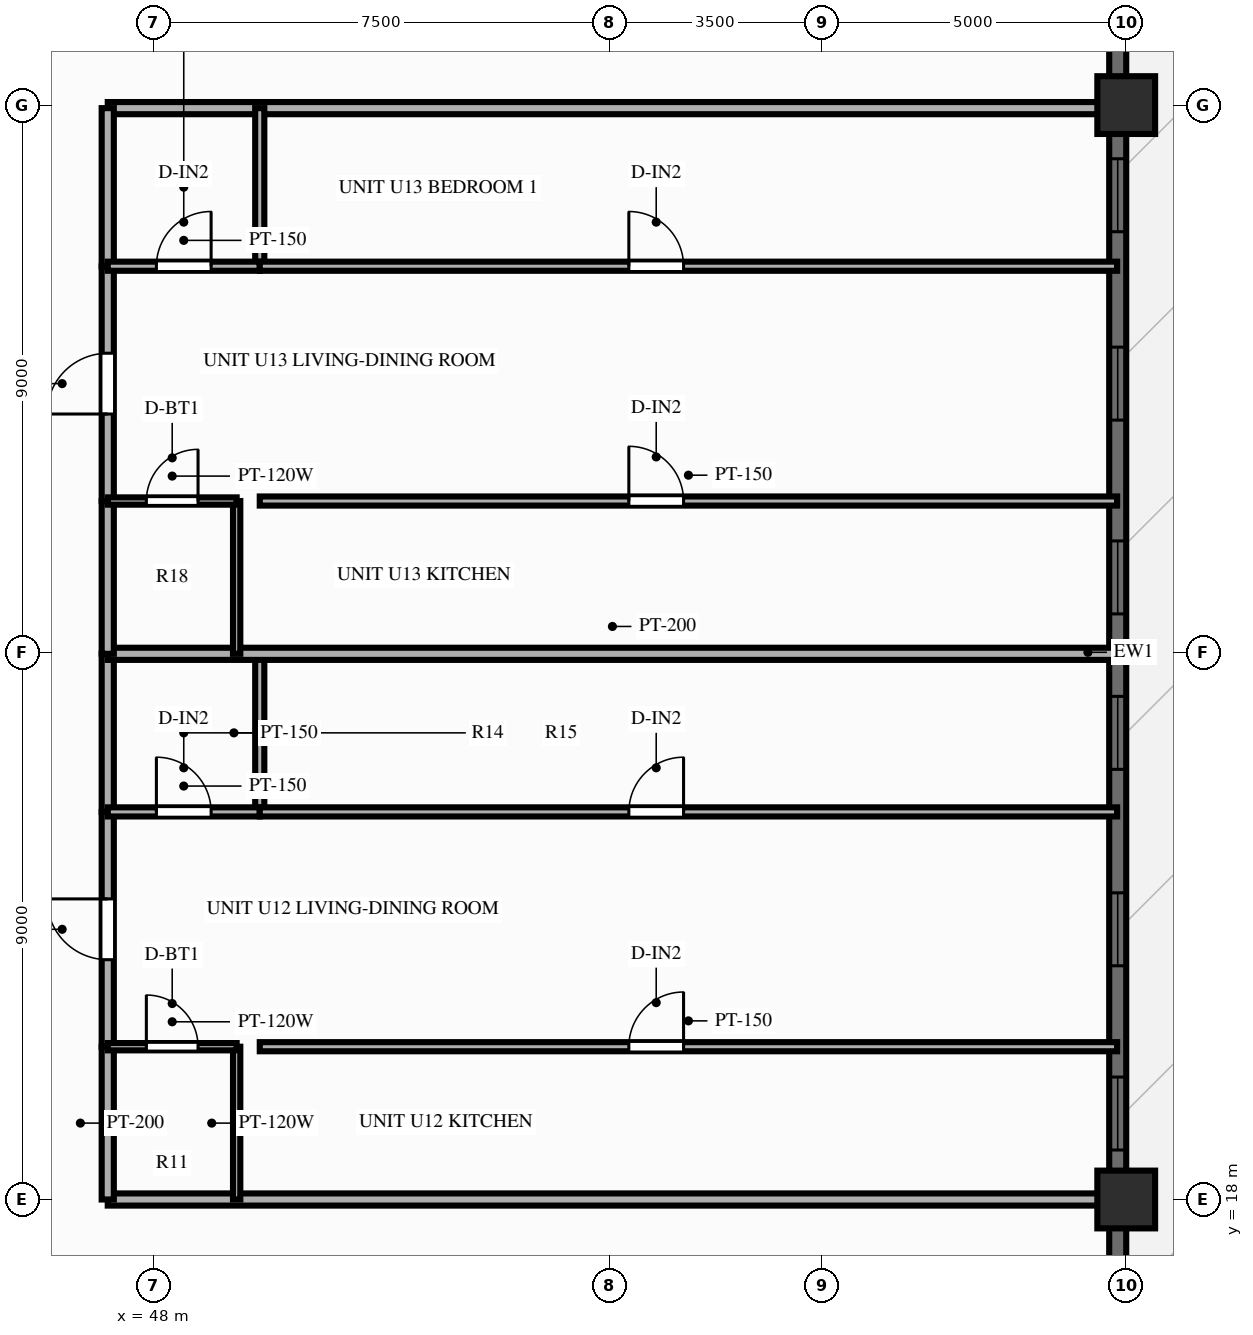
"""IFC4 building model, lengths in metres.
Left out: names, types, materials, properties, quantities, classifications, styles, units other than length and angle.
Written with IfcOpenShell. Run it as: python <this file> out.ifc"""

import sys

from ifc_helpers import new_model, si_unit, direction, frame, frame_2d, origin, origin_2d, place, context, subcontext, project, spatial, rectangle, extrude, source, transform, mapped, element, fill, save


model = new_model("IFC4")
c1 = context("Model", 3, precision=1e-05, world=origin(), true_north=direction((0.0, 1.0)))
c2 = subcontext(c1, "Body", "Model", "MODEL_VIEW")
j1 = project(units=[si_unit("LENGTHUNIT", "METRE"), si_unit("PLANEANGLEUNIT", "RADIAN")], contexts=[c1])
p1 = place(None, origin())
s1 = spatial("IfcSite", under=j1, at=p1, CompositionType="ELEMENT")
p2 = place(p1, origin())
s2 = spatial("IfcBuilding", under=s1, at=p2, CompositionType="ELEMENT")
p3 = place(p2, frame((0.0, 0.0, 86.85)))
s3 = spatial("IfcBuildingStorey", under=s2, at=p3, CompositionType="ELEMENT", Elevation=86.85)
m1 = source(origin(), c2, "Body", "SweptSolid", [
    extrude(rectangle(XDim=0.95, YDim=0.95, at=origin_2d()), origin(), (0.0, 0.0, 1.0), 3.0),
])
for number, where, z_axis, x_axis in (
    (1, (64.0, 18.0, 0.0), (0.0, 0.0, 1.0), (1.0, 0.0, 0.0)),
    (2, (64.0, 36.0, 0.0), (0.0, 0.0, 1.0), (1.0, 0.0, 0.0)),
):
    element("IfcColumn", number, at=place(p3, frame(where, z_axis=z_axis, x_axis=x_axis)), inside=s3, PredefinedType="COLUMN", context=c2, shape_type="MappedRepresentation", body=[
        mapped(m1, transform((0.0, 0.0, 0.0), scale=1.0)),
    ])
p4 = place(p3, frame((63.86, 7.2, 0.0), z_axis=(0.0, 0.0, 1.0), x_axis=(0.0, 1.0, 0.0)))
e3 = element("IfcWall", 3, at=p4, inside=s3, PredefinedType="SOLIDWALL", context=c2, shape_type="SweptSolid", body=[
    extrude(rectangle(XDim=39.6, YDim=0.28, at=frame_2d((19.8, 0.0))), origin(), (0.0, 0.0, 1.0), 2.28),
])
p5 = place(p4, frame((6.2, 0.0, 0.0), z_axis=(0.0, 0.0, 1.0), x_axis=(-1.0, 0.0, 0.0)))
e4 = element("IfcOpeningElement", 4, at=p5, cuts=e3, PredefinedType="OPENING", context=c2, shape_type="SweptSolid", body=[
    extrude(rectangle(XDim=1.6, YDim=2.15, at=frame_2d((0.8, 1.075))), frame((0.0, 0.152, 0.0), z_axis=(0.0, -1.0, 0.0), x_axis=(1.0, 0.0, 0.0)), (0.0, 0.0, 1.0), 0.304),
])
p6 = place(p4, frame((11.614, 0.0, 0.25)))
e5 = element("IfcOpeningElement", 5, at=p6, cuts=e3, PredefinedType="OPENING", context=c2, shape_type="SweptSolid", body=[
    extrude(rectangle(XDim=1.2, YDim=1.5, at=frame_2d((0.6, 0.75))), frame((0.0, 0.152, 0.0), z_axis=(0.0, -1.0, 0.0), x_axis=(1.0, 0.0, 0.0)), (0.0, 0.0, 1.0), 0.304),
])
p7 = place(p4, frame((14.644, 0.0, 0.25)))
e6 = element("IfcOpeningElement", 6, at=p7, cuts=e3, PredefinedType="OPENING", context=c2, shape_type="SweptSolid", body=[
    extrude(rectangle(XDim=1.2, YDim=1.5, at=frame_2d((0.6, 0.75))), frame((0.0, 0.152, 0.0), z_axis=(0.0, -1.0, 0.0), x_axis=(1.0, 0.0, 0.0)), (0.0, 0.0, 1.0), 0.304),
])
p8 = place(p4, frame((17.875, 0.0, 0.25)))
e7 = element("IfcOpeningElement", 7, at=p8, cuts=e3, PredefinedType="OPENING", context=c2, shape_type="SweptSolid", body=[
    extrude(rectangle(XDim=1.2, YDim=1.5, at=frame_2d((0.6, 0.75))), frame((0.0, 0.152, 0.0), z_axis=(0.0, -1.0, 0.0), x_axis=(1.0, 0.0, 0.0)), (0.0, 0.0, 1.0), 0.304),
])
p9 = place(p4, frame((20.431, 0.0, 0.25)))
e8 = element("IfcOpeningElement", 8, at=p9, cuts=e3, PredefinedType="OPENING", context=c2, shape_type="SweptSolid", body=[
    extrude(rectangle(XDim=1.2, YDim=1.5, at=frame_2d((0.6, 0.75))), frame((0.0, 0.152, 0.0), z_axis=(0.0, -1.0, 0.0), x_axis=(1.0, 0.0, 0.0)), (0.0, 0.0, 1.0), 0.304),
])
p10 = place(p4, frame((23.619, 0.0, 0.25)))
e9 = element("IfcOpeningElement", 9, at=p10, cuts=e3, PredefinedType="OPENING", context=c2, shape_type="SweptSolid", body=[
    extrude(rectangle(XDim=1.2, YDim=1.5, at=frame_2d((0.6, 0.75))), frame((0.0, 0.152, 0.0), z_axis=(0.0, -1.0, 0.0), x_axis=(1.0, 0.0, 0.0)), (0.0, 0.0, 1.0), 0.304),
])
p11 = place(p4, frame((26.718, 0.0, 0.25)))
e10 = element("IfcOpeningElement", 10, at=p11, cuts=e3, PredefinedType="OPENING", context=c2, shape_type="SweptSolid", body=[
    extrude(rectangle(XDim=1.2, YDim=1.5, at=frame_2d((0.6, 0.75))), frame((0.0, 0.152, 0.0), z_axis=(0.0, -1.0, 0.0), x_axis=(1.0, 0.0, 0.0)), (0.0, 0.0, 1.0), 0.304),
])
p12 = place(p4, frame((33.6, 0.0, 0.25)))
e11 = element("IfcOpeningElement", 11, at=p12, cuts=e3, PredefinedType="OPENING", context=c2, shape_type="SweptSolid", body=[
    extrude(rectangle(XDim=1.2, YDim=1.5, at=frame_2d((0.6, 0.75))), frame((0.0, 0.152, 0.0), z_axis=(0.0, -1.0, 0.0), x_axis=(1.0, 0.0, 0.0)), (0.0, 0.0, 1.0), 0.304),
])
for number, where, z_axis, x_axis in (
    (12, (47.25, 18.0, 0.0), (0.0, 0.0, 1.0), (1.0, 0.0, 0.0)),
    (13, (47.25, 35.95, 0.0), (0.0, 0.0, 1.0), (1.0, 0.0, 0.0)),
):
    element("IfcWall", number, at=place(p3, frame(where, z_axis=z_axis, x_axis=x_axis)), inside=s3, PredefinedType="PARTITIONING", context=c2, shape_type="SweptSolid", body=[
        extrude(rectangle(XDim=16.6, YDim=0.2, at=frame_2d((8.3, 0.0))), origin(), (0.0, 0.0, 1.0), 2.34),
    ])
p13 = place(p3, frame((47.25, 18.0, 0.0), z_axis=(0.0, 0.0, 1.0), x_axis=(0.0, 1.0, 0.0)))
e14 = element("IfcWall", 14, at=p13, inside=s3, PredefinedType="PARTITIONING", context=c2, shape_type="SweptSolid", body=[
    extrude(rectangle(XDim=2.513, YDim=0.2, at=frame_2d((1.256, 0.0))), origin(), (0.0, 0.0, 1.0), 2.79),
])
p14 = place(p3, frame((47.25, 20.513, 0.0), z_axis=(0.0, 0.0, 1.0), x_axis=(0.0, 1.0, 0.0)))
e15 = element("IfcWall", 15, at=p14, inside=s3, PredefinedType="PARTITIONING", context=c2, shape_type="SweptSolid", body=[
    extrude(rectangle(XDim=3.862, YDim=0.2, at=frame_2d((1.931, 0.0))), origin(), (0.0, 0.0, 1.0), 2.79),
])
p15 = place(p14, frame((1.431, 0.0, 0.0)))
e16 = element("IfcOpeningElement", 16, at=p15, cuts=e15, PredefinedType="OPENING", context=c2, shape_type="SweptSolid", body=[
    extrude(rectangle(XDim=1.0, YDim=2.15, at=frame_2d((0.5, 1.075))), frame((0.0, 0.112, 0.0), z_axis=(0.0, -1.0, 0.0), x_axis=(1.0, 0.0, 0.0)), (0.0, 0.0, 1.0), 0.224),
])
p16 = place(p3, frame((47.25, 24.375, 0.0), z_axis=(0.0, 0.0, 1.0), x_axis=(0.0, 1.0, 0.0)))
e17 = element("IfcWall", 17, at=p16, inside=s3, PredefinedType="PARTITIONING", context=c2, shape_type="SweptSolid", body=[
    extrude(rectangle(XDim=2.6, YDim=0.2, at=frame_2d((1.3, 0.0))), origin(), (0.0, 0.0, 1.0), 2.79),
])
p17 = place(p3, frame((49.37, 18.0, 0.0), z_axis=(0.0, 0.0, 1.0), x_axis=(0.0, 1.0, 0.0)))
e18 = element("IfcWall", 18, at=p17, inside=s3, PredefinedType="PARTITIONING", context=c2, shape_type="SweptSolid", body=[
    extrude(rectangle(XDim=2.513, YDim=0.12, at=frame_2d((1.256, 0.0))), origin(), (0.0, 0.0, 1.0), 2.79),
])
p18 = place(p3, frame((49.75, 24.375, 0.0), z_axis=(0.0, 0.0, 1.0), x_axis=(0.0, 1.0, 0.0)))
e19 = element("IfcWall", 19, at=p18, inside=s3, PredefinedType="PARTITIONING", context=c2, shape_type="SweptSolid", body=[
    extrude(rectangle(XDim=2.6, YDim=0.15, at=frame_2d((1.3, 0.0))), origin(), (0.0, 0.0, 1.0), 2.79),
])
p19 = place(p3, frame((47.25, 20.513, 0.0), z_axis=(0.0, 0.0, 1.0), x_axis=(1.0, 0.0, 0.0)))
e20 = element("IfcWall", 20, at=p19, inside=s3, PredefinedType="PARTITIONING", context=c2, shape_type="SweptSolid", body=[
    extrude(rectangle(XDim=2.12, YDim=0.12, at=frame_2d((1.06, 0.0))), origin(), (0.0, 0.0, 1.0), 2.79),
])
p20 = place(p19, frame((0.635, 0.0, 0.0)))
e21 = element("IfcOpeningElement", 21, at=p20, cuts=e20, PredefinedType="OPENING", context=c2, shape_type="SweptSolid", body=[
    extrude(rectangle(XDim=0.85, YDim=2.05, at=frame_2d((0.425, 1.025))), frame((0.0, 0.072, 0.0), z_axis=(0.0, -1.0, 0.0), x_axis=(1.0, 0.0, 0.0)), (0.0, 0.0, 1.0), 0.144),
])
p21 = place(p3, frame((49.75, 20.513, 0.0), z_axis=(0.0, 0.0, 1.0), x_axis=(1.0, 0.0, 0.0)))
e22 = element("IfcWall", 22, at=p21, inside=s3, PredefinedType="PARTITIONING", context=c2, shape_type="SweptSolid", body=[
    extrude(rectangle(XDim=14.1, YDim=0.15, at=frame_2d((7.05, 0.0))), origin(), (0.0, 0.0, 1.0), 2.79),
])
p22 = place(p21, frame((6.07, 0.0, 0.0)))
e23 = element("IfcOpeningElement", 23, at=p22, cuts=e22, PredefinedType="OPENING", context=c2, shape_type="SweptSolid", body=[
    extrude(rectangle(XDim=0.9, YDim=2.1, at=frame_2d((0.45, 1.05))), frame((0.0, 0.087, 0.0), z_axis=(0.0, -1.0, 0.0), x_axis=(1.0, 0.0, 0.0)), (0.0, 0.0, 1.0), 0.174),
])
p23 = place(p3, frame((47.25, 24.375, 0.0), z_axis=(0.0, 0.0, 1.0), x_axis=(1.0, 0.0, 0.0)))
e24 = element("IfcWall", 24, at=p23, inside=s3, PredefinedType="PARTITIONING", context=c2, shape_type="SweptSolid", body=[
    extrude(rectangle(XDim=2.5, YDim=0.15, at=frame_2d((1.25, 0.0))), origin(), (0.0, 0.0, 1.0), 2.79),
])
p24 = place(p23, frame((0.8, 0.0, 0.0)))
e25 = element("IfcOpeningElement", 25, at=p24, cuts=e24, PredefinedType="OPENING", context=c2, shape_type="SweptSolid", body=[
    extrude(rectangle(XDim=0.9, YDim=2.1, at=frame_2d((0.45, 1.05))), frame((0.0, 0.087, 0.0), z_axis=(0.0, -1.0, 0.0), x_axis=(1.0, 0.0, 0.0)), (0.0, 0.0, 1.0), 0.174),
])
p25 = place(p3, frame((49.75, 24.375, 0.0), z_axis=(0.0, 0.0, 1.0), x_axis=(1.0, 0.0, 0.0)))
e26 = element("IfcWall", 26, at=p25, inside=s3, PredefinedType="PARTITIONING", context=c2, shape_type="SweptSolid", body=[
    extrude(rectangle(XDim=14.1, YDim=0.15, at=frame_2d((7.05, 0.0))), origin(), (0.0, 0.0, 1.0), 2.79),
])
p26 = place(p25, frame((6.07, 0.0, 0.0)))
e27 = element("IfcOpeningElement", 27, at=p26, cuts=e26, PredefinedType="OPENING", context=c2, shape_type="SweptSolid", body=[
    extrude(rectangle(XDim=0.9, YDim=2.1, at=frame_2d((0.45, 1.05))), frame((0.0, 0.087, 0.0), z_axis=(0.0, -1.0, 0.0), x_axis=(1.0, 0.0, 0.0)), (0.0, 0.0, 1.0), 0.174),
])
p27 = place(p3, frame((47.25, 26.975, 0.0), z_axis=(0.0, 0.0, 1.0), x_axis=(1.0, 0.0, 0.0)))
e28 = element("IfcWall", 28, at=p27, inside=s3, PredefinedType="PARTITIONING", context=c2, shape_type="SweptSolid", body=[
    extrude(rectangle(XDim=16.6, YDim=0.2, at=frame_2d((8.3, 0.0))), origin(), (0.0, 0.0, 1.0), 2.79),
])
p28 = place(p3, frame((47.25, 26.975, 0.0), z_axis=(0.0, 0.0, 1.0), x_axis=(0.0, 1.0, 0.0)))
e29 = element("IfcWall", 29, at=p28, inside=s3, PredefinedType="PARTITIONING", context=c2, shape_type="SweptSolid", body=[
    extrude(rectangle(XDim=2.513, YDim=0.2, at=frame_2d((1.256, 0.0))), origin(), (0.0, 0.0, 1.0), 2.79),
])
p29 = place(p3, frame((47.25, 29.488, 0.0), z_axis=(0.0, 0.0, 1.0), x_axis=(0.0, 1.0, 0.0)))
e30 = element("IfcWall", 30, at=p29, inside=s3, PredefinedType="PARTITIONING", context=c2, shape_type="SweptSolid", body=[
    extrude(rectangle(XDim=3.862, YDim=0.2, at=frame_2d((1.931, 0.0))), origin(), (0.0, 0.0, 1.0), 2.79),
])
p30 = place(p29, frame((1.431, 0.0, 0.0)))
e31 = element("IfcOpeningElement", 31, at=p30, cuts=e30, PredefinedType="OPENING", context=c2, shape_type="SweptSolid", body=[
    extrude(rectangle(XDim=1.0, YDim=2.15, at=frame_2d((0.5, 1.075))), frame((0.0, 0.112, 0.0), z_axis=(0.0, -1.0, 0.0), x_axis=(1.0, 0.0, 0.0)), (0.0, 0.0, 1.0), 0.224),
])
p31 = place(p3, frame((47.25, 33.35, 0.0), z_axis=(0.0, 0.0, 1.0), x_axis=(0.0, 1.0, 0.0)))
e32 = element("IfcWall", 32, at=p31, inside=s3, PredefinedType="PARTITIONING", context=c2, shape_type="SweptSolid", body=[
    extrude(rectangle(XDim=2.6, YDim=0.2, at=frame_2d((1.3, 0.0))), origin(), (0.0, 0.0, 1.0), 2.79),
])
p32 = place(p3, frame((49.37, 26.975, 0.0), z_axis=(0.0, 0.0, 1.0), x_axis=(0.0, 1.0, 0.0)))
e33 = element("IfcWall", 33, at=p32, inside=s3, PredefinedType="PARTITIONING", context=c2, shape_type="SweptSolid", body=[
    extrude(rectangle(XDim=2.513, YDim=0.12, at=frame_2d((1.256, 0.0))), origin(), (0.0, 0.0, 1.0), 2.79),
])
p33 = place(p3, frame((49.75, 33.35, 0.0), z_axis=(0.0, 0.0, 1.0), x_axis=(0.0, 1.0, 0.0)))
e34 = element("IfcWall", 34, at=p33, inside=s3, PredefinedType="PARTITIONING", context=c2, shape_type="SweptSolid", body=[
    extrude(rectangle(XDim=2.6, YDim=0.15, at=frame_2d((1.3, 0.0))), origin(), (0.0, 0.0, 1.0), 2.79),
])
p34 = place(p3, frame((47.25, 29.488, 0.0), z_axis=(0.0, 0.0, 1.0), x_axis=(1.0, 0.0, 0.0)))
e35 = element("IfcWall", 35, at=p34, inside=s3, PredefinedType="PARTITIONING", context=c2, shape_type="SweptSolid", body=[
    extrude(rectangle(XDim=2.12, YDim=0.12, at=frame_2d((1.06, 0.0))), origin(), (0.0, 0.0, 1.0), 2.79),
])
p35 = place(p34, frame((0.635, 0.0, 0.0)))
e36 = element("IfcOpeningElement", 36, at=p35, cuts=e35, PredefinedType="OPENING", context=c2, shape_type="SweptSolid", body=[
    extrude(rectangle(XDim=0.85, YDim=2.05, at=frame_2d((0.425, 1.025))), frame((0.0, 0.072, 0.0), z_axis=(0.0, -1.0, 0.0), x_axis=(1.0, 0.0, 0.0)), (0.0, 0.0, 1.0), 0.144),
])
p36 = place(p3, frame((49.75, 29.488, 0.0), z_axis=(0.0, 0.0, 1.0), x_axis=(1.0, 0.0, 0.0)))
e37 = element("IfcWall", 37, at=p36, inside=s3, PredefinedType="PARTITIONING", context=c2, shape_type="SweptSolid", body=[
    extrude(rectangle(XDim=14.1, YDim=0.15, at=frame_2d((7.05, 0.0))), origin(), (0.0, 0.0, 1.0), 2.79),
])
p37 = place(p36, frame((6.07, 0.0, 0.0)))
e38 = element("IfcOpeningElement", 38, at=p37, cuts=e37, PredefinedType="OPENING", context=c2, shape_type="SweptSolid", body=[
    extrude(rectangle(XDim=0.9, YDim=2.1, at=frame_2d((0.45, 1.05))), frame((0.0, 0.087, 0.0), z_axis=(0.0, -1.0, 0.0), x_axis=(1.0, 0.0, 0.0)), (0.0, 0.0, 1.0), 0.174),
])
p38 = place(p3, frame((47.25, 33.35, 0.0), z_axis=(0.0, 0.0, 1.0), x_axis=(1.0, 0.0, 0.0)))
e39 = element("IfcWall", 39, at=p38, inside=s3, PredefinedType="PARTITIONING", context=c2, shape_type="SweptSolid", body=[
    extrude(rectangle(XDim=2.5, YDim=0.15, at=frame_2d((1.25, 0.0))), origin(), (0.0, 0.0, 1.0), 2.79),
])
p39 = place(p38, frame((0.8, 0.0, 0.0)))
e40 = element("IfcOpeningElement", 40, at=p39, cuts=e39, PredefinedType="OPENING", context=c2, shape_type="SweptSolid", body=[
    extrude(rectangle(XDim=0.9, YDim=2.1, at=frame_2d((0.45, 1.05))), frame((0.0, 0.087, 0.0), z_axis=(0.0, -1.0, 0.0), x_axis=(1.0, 0.0, 0.0)), (0.0, 0.0, 1.0), 0.174),
])
p40 = place(p3, frame((49.75, 33.35, 0.0), z_axis=(0.0, 0.0, 1.0), x_axis=(1.0, 0.0, 0.0)))
e41 = element("IfcWall", 41, at=p40, inside=s3, PredefinedType="PARTITIONING", context=c2, shape_type="SweptSolid", body=[
    extrude(rectangle(XDim=14.1, YDim=0.15, at=frame_2d((7.05, 0.0))), origin(), (0.0, 0.0, 1.0), 2.79),
])
p41 = place(p40, frame((6.07, 0.0, 0.0)))
e42 = element("IfcOpeningElement", 42, at=p41, cuts=e41, PredefinedType="OPENING", context=c2, shape_type="SweptSolid", body=[
    extrude(rectangle(XDim=0.9, YDim=2.1, at=frame_2d((0.45, 1.05))), frame((0.0, 0.087, 0.0), z_axis=(0.0, -1.0, 0.0), x_axis=(1.0, 0.0, 0.0)), (0.0, 0.0, 1.0), 0.174),
])
m2 = source(origin(), c2, "Body", "SweptSolid", [
    extrude(rectangle(XDim=1.2, YDim=1.5, at=frame_2d((0.6, 0.75))), frame((0.0, 0.03, 0.0), z_axis=(0.0, -1.0, 0.0), x_axis=(1.0, 0.0, 0.0)), (0.0, 0.0, 1.0), 0.06),
])
p42 = place(p6, origin())
e43 = element("IfcWindow", 43, at=p42, inside=s3, PartitioningType="SINGLE_PANEL", PredefinedType="WINDOW", context=c2, shape_type="MappedRepresentation", body=[
    mapped(m2, transform((0.0, 0.0, 0.0), scale=1.0)),
])
fill(e5, e43)
p43 = place(p7, origin())
e44 = element("IfcWindow", 44, at=p43, inside=s3, PartitioningType="SINGLE_PANEL", PredefinedType="WINDOW", context=c2, shape_type="MappedRepresentation", body=[
    mapped(m2, transform((0.0, 0.0, 0.0), scale=1.0)),
])
fill(e6, e44)
p44 = place(p8, origin())
e45 = element("IfcWindow", 45, at=p44, inside=s3, PartitioningType="SINGLE_PANEL", PredefinedType="WINDOW", context=c2, shape_type="MappedRepresentation", body=[
    mapped(m2, transform((0.0, 0.0, 0.0), scale=1.0)),
])
fill(e7, e45)
p45 = place(p9, origin())
e46 = element("IfcWindow", 46, at=p45, inside=s3, PartitioningType="SINGLE_PANEL", PredefinedType="WINDOW", context=c2, shape_type="MappedRepresentation", body=[
    mapped(m2, transform((0.0, 0.0, 0.0), scale=1.0)),
])
fill(e8, e46)
p46 = place(p10, origin())
e47 = element("IfcWindow", 47, at=p46, inside=s3, PartitioningType="SINGLE_PANEL", PredefinedType="WINDOW", context=c2, shape_type="MappedRepresentation", body=[
    mapped(m2, transform((0.0, 0.0, 0.0), scale=1.0)),
])
fill(e9, e47)
p47 = place(p11, origin())
e48 = element("IfcWindow", 48, at=p47, inside=s3, PartitioningType="SINGLE_PANEL", PredefinedType="WINDOW", context=c2, shape_type="MappedRepresentation", body=[
    mapped(m2, transform((0.0, 0.0, 0.0), scale=1.0)),
])
fill(e10, e48)
m3 = source(origin(), c2, "Body", "SweptSolid", [
    extrude(rectangle(XDim=1.0, YDim=2.15, at=frame_2d((0.5, 1.075))), frame((0.0, 0.025, 0.0), z_axis=(0.0, -1.0, 0.0), x_axis=(1.0, 0.0, 0.0)), (0.0, 0.0, 1.0), 0.05),
])
p48 = place(p15, origin())
e49 = element("IfcDoor", 49, at=p48, inside=s3, OperationType="SINGLE_SWING_RIGHT", PredefinedType="DOOR", context=c2, shape_type="MappedRepresentation", body=[
    mapped(m3, transform((0.0, 0.0, 0.0), scale=1.0)),
])
fill(e16, e49)
m4 = source(origin(), c2, "Body", "SweptSolid", [
    extrude(rectangle(XDim=0.85, YDim=2.05, at=frame_2d((0.425, 1.025))), frame((0.0, 0.025, 0.0), z_axis=(0.0, -1.0, 0.0), x_axis=(1.0, 0.0, 0.0)), (0.0, 0.0, 1.0), 0.05),
])
p49 = place(p20, origin())
e50 = element("IfcDoor", 50, at=p49, inside=s3, OperationType="SINGLE_SWING_LEFT", PredefinedType="DOOR", context=c2, shape_type="MappedRepresentation", body=[
    mapped(m4, transform((0.0, 0.0, 0.0), scale=1.0)),
])
fill(e21, e50)
m5 = source(origin(), c2, "Body", "SweptSolid", [
    extrude(rectangle(XDim=0.9, YDim=2.1, at=frame_2d((0.45, 1.05))), frame((0.0, 0.025, 0.0), z_axis=(0.0, -1.0, 0.0), x_axis=(1.0, 0.0, 0.0)), (0.0, 0.0, 1.0), 0.05),
])
p50 = place(p22, origin())
e51 = element("IfcDoor", 51, at=p50, inside=s3, OperationType="SINGLE_SWING_RIGHT", PredefinedType="DOOR", context=c2, shape_type="MappedRepresentation", body=[
    mapped(m5, transform((0.0, 0.0, 0.0), scale=1.0)),
])
fill(e23, e51)
p51 = place(p24, origin())
e52 = element("IfcDoor", 52, at=p51, inside=s3, OperationType="SINGLE_SWING_LEFT", PredefinedType="DOOR", context=c2, shape_type="MappedRepresentation", body=[
    mapped(m5, transform((0.0, 0.0, 0.0), scale=1.0)),
])
fill(e25, e52)
p52 = place(p26, origin())
e53 = element("IfcDoor", 53, at=p52, inside=s3, OperationType="SINGLE_SWING_RIGHT", PredefinedType="DOOR", context=c2, shape_type="MappedRepresentation", body=[
    mapped(m5, transform((0.0, 0.0, 0.0), scale=1.0)),
])
fill(e27, e53)
p53 = place(p30, origin())
e54 = element("IfcDoor", 54, at=p53, inside=s3, OperationType="SINGLE_SWING_LEFT", PredefinedType="DOOR", context=c2, shape_type="MappedRepresentation", body=[
    mapped(m3, transform((0.0, 0.0, 0.0), scale=1.0)),
])
fill(e31, e54)
p54 = place(p35, origin())
e55 = element("IfcDoor", 55, at=p54, inside=s3, OperationType="SINGLE_SWING_RIGHT", PredefinedType="DOOR", context=c2, shape_type="MappedRepresentation", body=[
    mapped(m4, transform((0.0, 0.0, 0.0), scale=1.0)),
])
fill(e36, e55)
p55 = place(p37, origin())
e56 = element("IfcDoor", 56, at=p55, inside=s3, OperationType="SINGLE_SWING_LEFT", PredefinedType="DOOR", context=c2, shape_type="MappedRepresentation", body=[
    mapped(m5, transform((0.0, 0.0, 0.0), scale=1.0)),
])
fill(e38, e56)
p56 = place(p39, origin())
e57 = element("IfcDoor", 57, at=p56, inside=s3, OperationType="SINGLE_SWING_RIGHT", PredefinedType="DOOR", context=c2, shape_type="MappedRepresentation", body=[
    mapped(m5, transform((0.0, 0.0, 0.0), scale=1.0)),
])
fill(e40, e57)
p57 = place(p41, origin())
e58 = element("IfcDoor", 58, at=p57, inside=s3, OperationType="SINGLE_SWING_LEFT", PredefinedType="DOOR", context=c2, shape_type="MappedRepresentation", body=[
    mapped(m5, transform((0.0, 0.0, 0.0), scale=1.0)),
])
fill(e42, e58)
save(model, sys.argv[1])
